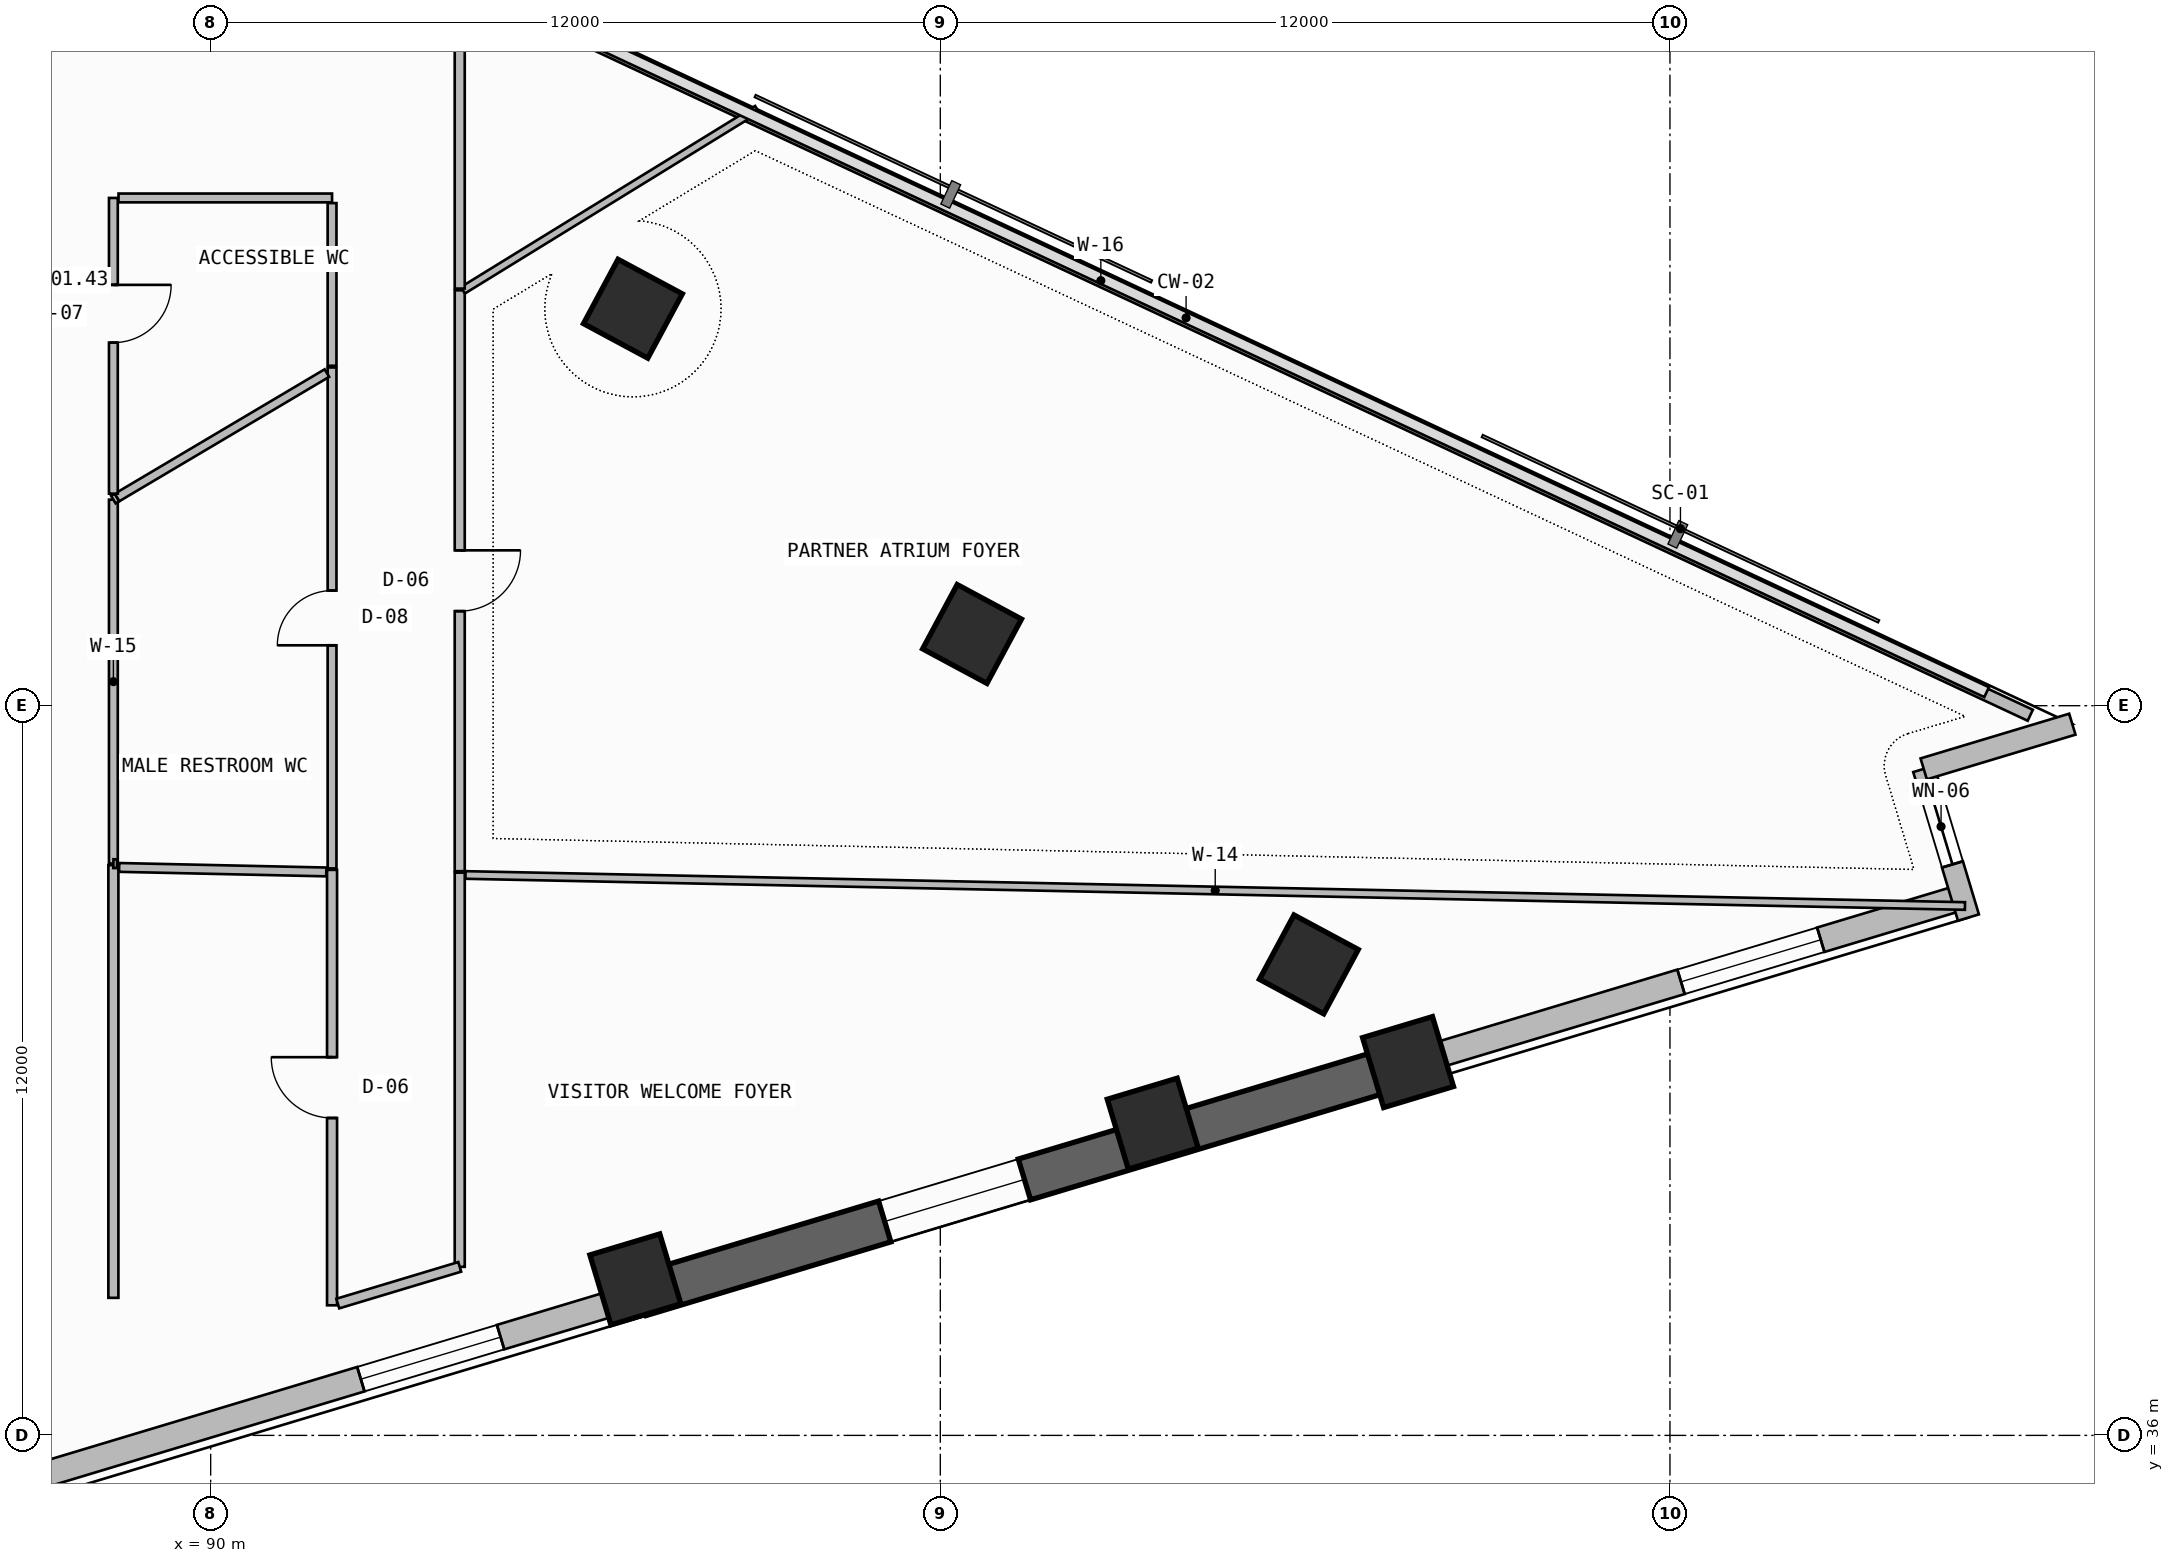
"""IFC4 building model, lengths in metres.
Left out: names, types, materials, properties, quantities, classifications, styles, units other than length and angle.
Written with IfcOpenShell. Run it as: python <this file> out.ifc"""

import sys

from ifc_helpers import new_model, si_unit, direction, frame, frame_2d, origin, origin_2d, place, context, subcontext, project, spatial, rectangle, extrude, element, fill, save


model = new_model("IFC4")
c1 = context("Model", 3, precision=1e-05, world=origin(), true_north=direction((0.0, 1.0)))
c2 = subcontext(c1, "Body", "Model", "MODEL_VIEW")
j1 = project(units=[si_unit("LENGTHUNIT", "METRE"), si_unit("PLANEANGLEUNIT", "RADIAN")], contexts=[c1])
p1 = place(None, origin())
s1 = spatial("IfcSite", under=j1, at=p1, CompositionType="ELEMENT")
p2 = place(p1, origin())
s2 = spatial("IfcBuilding", under=s1, at=p2, CompositionType="ELEMENT")
p3 = place(p2, frame((0.0, 0.0, 153.9)))
s3 = spatial("IfcBuildingStorey", under=s2, at=p3, CompositionType="ELEMENT", Elevation=153.9)
for number, where, z_axis, x_axis in (
    (1, (96.985, 38.565, 0.0), (0.0, 0.0, 1.0), (0.958, 0.288, 0.0)),
    (2, (105.494, 41.126, 0.0), (0.0, 0.0, 1.0), (0.958, 0.288, 0.0)),
    (3, (109.693, 42.139, 0.0), (0.0, 0.0, 1.0), (0.958, 0.288, 0.0)),
    (4, (108.061, 43.746, 0.0), (0.0, 0.0, 1.0), (0.473, 0.881, 0.0)),
    (5, (102.522, 49.179, 0.0), (0.0, 0.0, 1.0), (0.473, 0.881, 0.0)),
    (6, (96.944, 54.528, 0.0), (0.0, 0.0, 1.0), (0.473, 0.881, 0.0)),
):
    element("IfcColumn", number, at=place(p3, frame(where, z_axis=z_axis, x_axis=x_axis)), inside=s3, PredefinedType="COLUMN", context=c2, shape_type="SweptSolid", body=[
        extrude(rectangle(XDim=1.2, YDim=1.2, at=origin_2d()), origin(), (0.0, 0.0, 1.0), 3.6),
    ])
p4 = place(p3, frame((86.1, 35.007, 0.0), z_axis=(0.0, 0.0, 1.0), x_axis=(0.957569401796, 0.288202777129, 0.0)))
e7 = element("IfcWall", 7, at=p4, inside=s3, PredefinedType="SOLIDWALL", context=c2, shape_type="SweptSolid", body=[
    extrude(rectangle(XDim=11.448, YDim=0.42, at=frame_2d((5.724, 0.0))), origin(), (0.0, 0.0, 1.0), 2.325),
])
p5 = place(p4, frame((6.652, 0.0, 1.2)))
e8 = element("IfcOpeningElement", 8, at=p5, cuts=e7, PredefinedType="OPENING", context=c2, shape_type="SweptSolid", body=[
    extrude(rectangle(XDim=2.4, YDim=0.9, at=frame_2d((1.2, 0.45))), frame((0.0, 0.22, 0.0), z_axis=(0.0, -1.0, 0.0), x_axis=(1.0, 0.0, 0.0)), (0.0, 0.0, 1.0), 0.44),
])
p6 = place(p3, frame((97.062, 38.307, -0.26), z_axis=(0.0, 0.0, 1.0), x_axis=(0.957569832102, 0.288201347408, 0.0)))
e9 = element("IfcWall", 9, at=p6, inside=s3, PredefinedType="SHEAR", context=c2, shape_type="SweptSolid", body=[
    extrude(rectangle(XDim=13.199, YDim=0.7, at=frame_2d((6.6, 0.0))), origin(), (0.0, 0.0, 1.0), 3.6),
])
p7 = place(p6, frame((4.201, 0.0, 1.2)))
e10 = element("IfcOpeningElement", 10, at=p7, cuts=e9, PredefinedType="OPENING", context=c2, shape_type="SweptSolid", body=[
    extrude(rectangle(XDim=2.4, YDim=0.9, at=frame_2d((1.2, 0.45))), frame((0.0, 0.36, 0.0), z_axis=(0.0, -1.0, 0.0), x_axis=(1.0, 0.0, 0.0)), (0.0, 0.0, 1.0), 0.72),
])
p8 = place(p3, frame((109.701, 42.111, 0.0), z_axis=(0.0, 0.0, 1.0), x_axis=(0.957575807765, 0.288181492091, 0.0)))
e11 = element("IfcWall", 11, at=p8, inside=s3, PredefinedType="SOLIDWALL", context=c2, shape_type="SweptSolid", body=[
    extrude(rectangle(XDim=9.51, YDim=0.42, at=frame_2d((4.755, 0.0))), origin(), (0.0, 0.0, 1.0), 2.325),
])
p9 = place(p8, frame((4.679, 0.0, 1.2)))
e12 = element("IfcOpeningElement", 12, at=p9, cuts=e11, PredefinedType="OPENING", context=c2, shape_type="SweptSolid", body=[
    extrude(rectangle(XDim=2.4, YDim=0.9, at=frame_2d((1.2, 0.45))), frame((0.0, 0.22, 0.0), z_axis=(0.0, -1.0, 0.0), x_axis=(1.0, 0.0, 0.0)), (0.0, 0.0, 1.0), 0.44),
])
p10 = place(p3, frame((118.909, 44.516, 0.0), z_axis=(0.0, 0.0, 1.0), x_axis=(-0.288172590882, 0.95757848653, 0.0)))
e13 = element("IfcWall", 13, at=p10, inside=s3, PredefinedType="SOLIDWALL", context=c2, shape_type="SweptSolid", body=[
    extrude(rectangle(XDim=2.553, YDim=0.36, at=frame_2d((1.276, 0.0))), origin(), (0.0, 0.0, 1.0), 3.34),
])
p11 = place(p10, frame((0.913, 0.0, 0.45)))
e14 = element("IfcOpeningElement", 14, at=p11, cuts=e13, PredefinedType="OPENING", context=c2, shape_type="SweptSolid", body=[
    extrude(rectangle(XDim=1.3, YDim=2.4, at=frame_2d((0.65, 1.2))), frame((0.0, 0.19, 0.0), z_axis=(0.0, -1.0, 0.0), x_axis=(1.0, 0.0, 0.0)), (0.0, 0.0, 1.0), 0.38),
])
p12 = place(p3, frame((118.173, 46.96, 0.0), z_axis=(0.0, 0.0, 1.0), x_axis=(0.95757848653, 0.288172590882, 0.0)))
e15 = element("IfcWall", 15, at=p12, inside=s3, PredefinedType="SOLIDWALL", context=c2, shape_type="SweptSolid", body=[
    extrude(rectangle(XDim=2.553, YDim=0.36, at=frame_2d((1.276, 0.0))), origin(), (0.0, 0.0, 1.0), 3.34),
])
p13 = place(p3, frame((119.926, 47.843, 0.0), z_axis=(0.0, 0.0, 1.0), x_axis=(-0.905880730846, 0.423532881228, 0.0)))
e16 = element("IfcWall", 16, at=p13, inside=s3, PredefinedType="PARAPET", context=c2, shape_type="SweptSolid", body=[
    extrude(rectangle(XDim=33.748, YDim=0.2, at=frame_2d((16.874, 0.0))), origin(), (0.0, 0.0, 1.0), 1.15),
])
p14 = place(p3, frame((91.996, 45.3, 0.0), z_axis=(0.0, 0.0, 1.0), x_axis=(0.0, -1.0, 0.0)))
e17 = element("IfcWall", 17, at=p14, inside=s3, PredefinedType="PARTITIONING", context=c2, shape_type="SweptSolid", body=[
    extrude(rectangle(XDim=7.161, YDim=0.165, at=frame_2d((3.58, 0.0))), origin(), (0.0, 0.0, 1.0), 2.725),
])
p15 = place(p14, frame((3.08, 0.0, 0.0)))
e18 = element("IfcOpeningElement", 18, at=p15, cuts=e17, PredefinedType="OPENING", context=c2, shape_type="SweptSolid", body=[
    extrude(rectangle(XDim=1.0, YDim=2.2, at=frame_2d((0.5, 1.1))), frame((0.0, 0.093, 0.0), z_axis=(0.0, -1.0, 0.0), x_axis=(1.0, 0.0, 0.0)), (0.0, 0.0, 1.0), 0.185),
])
p16 = place(p3, frame((88.4, 38.262, 0.0), z_axis=(0.0, 0.0, 1.0), x_axis=(0.0, 1.0, 0.0)))
e19 = element("IfcWall", 19, at=p16, inside=s3, PredefinedType="PARTITIONING", context=c2, shape_type="SweptSolid", body=[
    extrude(rectangle(XDim=7.116, YDim=0.165, at=frame_2d((3.558, 0.0))), origin(), (0.0, 0.0, 1.0), 2.725),
])
p17 = place(p3, frame((94.096, 38.771, 0.0), z_axis=(0.0, 0.0, 1.0), x_axis=(0.0, 1.0, 0.0)))
e20 = element("IfcWall", 20, at=p17, inside=s3, PredefinedType="PARTITIONING", context=c2, shape_type="SweptSolid", body=[
    extrude(rectangle(XDim=6.483, YDim=0.165, at=frame_2d((3.241, 0.0))), origin(), (0.0, 0.0, 1.0), 2.725),
])
p18 = place(p3, frame((92.091, 38.168, 0.0), z_axis=(0.0, 0.0, 1.0), x_axis=(0.957575652527, 0.288182007919, 0.0)))
e21 = element("IfcWall", 21, at=p18, inside=s3, PredefinedType="PARTITIONING", context=c2, shape_type="SweptSolid", body=[
    extrude(rectangle(XDim=2.094, YDim=0.165, at=frame_2d((1.047, 0.0))), origin(), (0.0, 0.0, 1.0), 3.34),
])
p19 = place(p3, frame((94.191, 45.216, 0.0), z_axis=(0.0, 0.0, 1.0), x_axis=(0.999785813259, -0.020696077055, 0.0)))
e22 = element("IfcWall", 22, at=p19, inside=s3, PredefinedType="PARTITIONING", context=c2, shape_type="SweptSolid", body=[
    extrude(rectangle(XDim=24.667, YDim=0.125, at=frame_2d((12.333, 0.0))), origin(), (0.0, 0.0, 1.0), 2.725),
])
p20 = place(p3, frame((88.494, 45.34, 0.0), z_axis=(0.0, 0.0, 1.0), x_axis=(0.999762874358, -0.021776020191, 0.0)))
e23 = element("IfcWall", 23, at=p20, inside=s3, PredefinedType="PARTITIONING", context=c2, shape_type="SweptSolid", body=[
    extrude(rectangle(XDim=3.408, YDim=0.145, at=frame_2d((1.704, 0.0))), origin(), (0.0, 0.0, 1.0), 2.725),
])
p21 = place(p3, frame((94.096, 45.278, 0.0), z_axis=(0.0, 0.0, 1.0), x_axis=(0.0, 1.0, 0.0)))
e24 = element("IfcWall", 24, at=p21, inside=s3, PredefinedType="PARTITIONING", context=c2, shape_type="SweptSolid", body=[
    extrude(rectangle(XDim=9.553, YDim=0.165, at=frame_2d((4.777, 0.0))), origin(), (0.0, 0.0, 1.0), 2.725),
])
p22 = place(p21, frame((4.277, 0.0, 0.0)))
e25 = element("IfcOpeningElement", 25, at=p22, cuts=e24, PredefinedType="OPENING", context=c2, shape_type="SweptSolid", body=[
    extrude(rectangle(XDim=1.0, YDim=2.2, at=frame_2d((0.5, 1.1))), frame((0.0, 0.093, 0.0), z_axis=(0.0, -1.0, 0.0), x_axis=(1.0, 0.0, 0.0)), (0.0, 0.0, 1.0), 0.185),
])
p23 = place(p3, frame((94.148, 54.832, 0.0), z_axis=(0.0, 0.0, 1.0), x_axis=(0.851656841351, 0.524099823106, 0.0)))
e26 = element("IfcWall", 26, at=p23, inside=s3, PredefinedType="PARTITIONING", context=c2, shape_type="SweptSolid", body=[
    extrude(rectangle(XDim=5.682, YDim=0.125, at=frame_2d((2.841, 0.0))), origin(), (0.0, 0.0, 1.0), 2.725),
])
p24 = place(p3, frame((91.996, 53.562, 0.0), z_axis=(0.0, 0.0, 1.0), x_axis=(0.0, -1.0, 0.0)))
e27 = element("IfcWall", 27, at=p24, inside=s3, PredefinedType="PARTITIONING", context=c2, shape_type="SweptSolid", body=[
    extrude(rectangle(XDim=8.238, YDim=0.145, at=frame_2d((4.119, 0.0))), origin(), (0.0, 0.0, 1.0), 2.725),
])
p25 = place(p24, frame((3.669, 0.0, 0.0)))
e28 = element("IfcOpeningElement", 28, at=p25, cuts=e27, PredefinedType="OPENING", context=c2, shape_type="SweptSolid", body=[
    extrude(rectangle(XDim=0.9, YDim=2.1, at=frame_2d((0.45, 1.05))), frame((0.0, 0.083, 0.0), z_axis=(0.0, -1.0, 0.0), x_axis=(1.0, 0.0, 0.0)), (0.0, 0.0, 1.0), 0.165),
])
p26 = place(p3, frame((88.4, 45.403, 0.0), z_axis=(0.0, 0.0, 1.0), x_axis=(0.0, 1.0, 0.0)))
e29 = element("IfcWall", 29, at=p26, inside=s3, PredefinedType="PARTITIONING", context=c2, shape_type="SweptSolid", body=[
    extrude(rectangle(XDim=5.986, YDim=0.145, at=frame_2d((2.993, 0.0))), origin(), (0.0, 0.0, 1.0), 3.34),
])
p27 = place(p3, frame((88.4, 51.388, 0.0), z_axis=(0.0, 0.0, 1.0), x_axis=(0.855337907093, 0.518070520963, 0.0)))
e30 = element("IfcWall", 30, at=p27, inside=s3, PredefinedType="PARTITIONING", context=c2, shape_type="SweptSolid", body=[
    extrude(rectangle(XDim=0.07, YDim=0.145, at=frame_2d((0.035, 0.0))), origin(), (0.0, 0.0, 1.0), 3.34),
])
p28 = place(p3, frame((88.46, 45.401, 0.0), z_axis=(0.0, 0.0, 1.0), x_axis=(-0.999702690643, 0.024382992455, 0.0)))
e31 = element("IfcWall", 31, at=p28, inside=s3, PredefinedType="PARTITIONING", context=c2, shape_type="SweptSolid", body=[
    extrude(rectangle(XDim=0.06, YDim=0.145, at=frame_2d((0.03, 0.0))), origin(), (0.0, 0.0, 1.0), 3.34),
])
p29 = place(p3, frame((88.46, 51.424, 0.0), z_axis=(0.0, 0.0, 1.0), x_axis=(0.860266822839, 0.509844087464, 0.0)))
e32 = element("IfcWall", 32, at=p29, inside=s3, PredefinedType="PARTITIONING", context=c2, shape_type="SweptSolid", body=[
    extrude(rectangle(XDim=4.012, YDim=0.145, at=frame_2d((2.006, 0.0))), origin(), (0.0, 0.0, 1.0), 2.925),
])
p30 = place(p3, frame((88.4, 51.487, 0.0), z_axis=(0.0, 0.0, 1.0), x_axis=(0.0, 1.0, 0.0)))
e33 = element("IfcWall", 33, at=p30, inside=s3, PredefinedType="PARTITIONING", context=c2, shape_type="SweptSolid", body=[
    extrude(rectangle(XDim=4.863, YDim=0.145, at=frame_2d((2.431, 0.0))), origin(), (0.0, 0.0, 1.0), 2.725),
])
p31 = place(p30, frame((2.483, 0.0, 0.0)))
e34 = element("IfcOpeningElement", 34, at=p31, cuts=e33, PredefinedType="OPENING", context=c2, shape_type="SweptSolid", body=[
    extrude(rectangle(XDim=0.95, YDim=2.15, at=frame_2d((0.475, 1.075))), frame((0.0, 0.083, 0.0), z_axis=(0.0, -1.0, 0.0), x_axis=(1.0, 0.0, 0.0)), (0.0, 0.0, 1.0), 0.165),
])
p32 = place(p3, frame((88.485, 56.35, 0.0), z_axis=(0.0, 0.0, 1.0), x_axis=(1.0, 0.0, 0.0)))
e35 = element("IfcWall", 35, at=p32, inside=s3, PredefinedType="PARTITIONING", context=c2, shape_type="SweptSolid", body=[
    extrude(rectangle(XDim=3.512, YDim=0.145, at=frame_2d((1.756, 0.0))), origin(), (0.0, 0.0, 1.0), 2.925),
])
p33 = place(p3, frame((91.996, 56.265, 0.0), z_axis=(0.0, 0.0, 1.0), x_axis=(0.0, -1.0, 0.0)))
e36 = element("IfcWall", 36, at=p33, inside=s3, PredefinedType="PARTITIONING", context=c2, shape_type="SweptSolid", body=[
    extrude(rectangle(XDim=2.675, YDim=0.145, at=frame_2d((1.338, 0.0))), origin(), (0.0, 0.0, 1.0), 2.725),
])
p34 = place(p3, frame((94.096, 54.86, 0.0), z_axis=(0.0, 0.0, 1.0), x_axis=(0.0, 1.0, 0.0)))
e37 = element("IfcWall", 37, at=p34, inside=s3, PredefinedType="PARTITIONING", context=c2, shape_type="SweptSolid", body=[
    extrude(rectangle(XDim=3.983, YDim=0.165, at=frame_2d((1.991, 0.0))), origin(), (0.0, 0.0, 1.0), 2.725),
])
p35 = place(p5, origin())
e38 = element("IfcWindow", 38, at=p35, inside=s3, PartitioningType="SINGLE_PANEL", PredefinedType="WINDOW", context=c2, shape_type="SweptSolid", body=[
    extrude(rectangle(XDim=2.4, YDim=0.9, at=frame_2d((1.2, 0.45))), frame((0.0, 0.03, 0.0), z_axis=(0.0, -1.0, 0.0), x_axis=(1.0, 0.0, 0.0)), (0.0, 0.0, 1.0), 0.06),
])
fill(e8, e38)
p36 = place(p7, origin())
e39 = element("IfcWindow", 39, at=p36, inside=s3, PartitioningType="SINGLE_PANEL", PredefinedType="WINDOW", context=c2, shape_type="SweptSolid", body=[
    extrude(rectangle(XDim=2.4, YDim=0.9, at=frame_2d((1.2, 0.45))), frame((0.0, 0.03, 0.0), z_axis=(0.0, -1.0, 0.0), x_axis=(1.0, 0.0, 0.0)), (0.0, 0.0, 1.0), 0.06),
])
fill(e10, e39)
p37 = place(p9, origin())
e40 = element("IfcWindow", 40, at=p37, inside=s3, PartitioningType="SINGLE_PANEL", PredefinedType="WINDOW", context=c2, shape_type="SweptSolid", body=[
    extrude(rectangle(XDim=2.4, YDim=0.9, at=frame_2d((1.2, 0.45))), frame((0.0, 0.03, 0.0), z_axis=(0.0, -1.0, 0.0), x_axis=(1.0, 0.0, 0.0)), (0.0, 0.0, 1.0), 0.06),
])
fill(e12, e40)
p38 = place(p11, origin())
e41 = element("IfcWindow", 41, at=p38, inside=s3, PartitioningType="SINGLE_PANEL", PredefinedType="WINDOW", context=c2, shape_type="SweptSolid", body=[
    extrude(rectangle(XDim=1.3, YDim=2.4, at=frame_2d((0.65, 1.2))), frame((0.0, 0.03, 0.0), z_axis=(0.0, -1.0, 0.0), x_axis=(1.0, 0.0, 0.0)), (0.0, 0.0, 1.0), 0.06),
])
fill(e14, e41)
p39 = place(p15, frame((1.0, 0.0, 0.0), z_axis=(0.0, 0.0, 1.0), x_axis=(-1.0, 0.0, 0.0)))
e42 = element("IfcDoor", 42, at=p39, inside=s3, OperationType="SINGLE_SWING_RIGHT", PredefinedType="DOOR", context=c2, shape_type="SweptSolid", body=[
    extrude(rectangle(XDim=1.0, YDim=2.2, at=frame_2d((0.5, 1.1))), frame((0.0, 0.025, 0.0), z_axis=(0.0, -1.0, 0.0), x_axis=(1.0, 0.0, 0.0)), (0.0, 0.0, 1.0), 0.05),
])
fill(e18, e42)
p40 = place(p22, frame((1.0, 0.0, 0.0), z_axis=(0.0, 0.0, 1.0), x_axis=(-1.0, 0.0, 0.0)))
e43 = element("IfcDoor", 43, at=p40, inside=s3, OperationType="SINGLE_SWING_LEFT", PredefinedType="DOOR", context=c2, shape_type="SweptSolid", body=[
    extrude(rectangle(XDim=1.0, YDim=2.2, at=frame_2d((0.5, 1.1))), frame((0.0, 0.025, 0.0), z_axis=(0.0, -1.0, 0.0), x_axis=(1.0, 0.0, 0.0)), (0.0, 0.0, 1.0), 0.05),
])
fill(e25, e43)
p41 = place(p25, frame((0.9, 0.0, 0.0), z_axis=(0.0, 0.0, 1.0), x_axis=(-1.0, 0.0, 0.0)))
e44 = element("IfcDoor", 44, at=p41, inside=s3, OperationType="SINGLE_SWING_LEFT", PredefinedType="DOOR", context=c2, shape_type="SweptSolid", body=[
    extrude(rectangle(XDim=0.9, YDim=2.1, at=frame_2d((0.45, 1.05))), frame((0.0, 0.025, 0.0), z_axis=(0.0, -1.0, 0.0), x_axis=(1.0, 0.0, 0.0)), (0.0, 0.0, 1.0), 0.05),
])
fill(e28, e44)
p42 = place(p31, frame((0.95, 0.0, 0.0), z_axis=(0.0, 0.0, 1.0), x_axis=(-1.0, 0.0, 0.0)))
e45 = element("IfcDoor", 45, at=p42, inside=s3, OperationType="SINGLE_SWING_LEFT", PredefinedType="DOOR", context=c2, shape_type="SweptSolid", body=[
    extrude(rectangle(XDim=0.95, YDim=2.15, at=frame_2d((0.475, 1.075))), frame((0.0, 0.025, 0.0), z_axis=(0.0, -1.0, 0.0), x_axis=(1.0, 0.0, 0.0)), (0.0, 0.0, 1.0), 0.05),
])
fill(e34, e45)
save(model, sys.argv[1])
